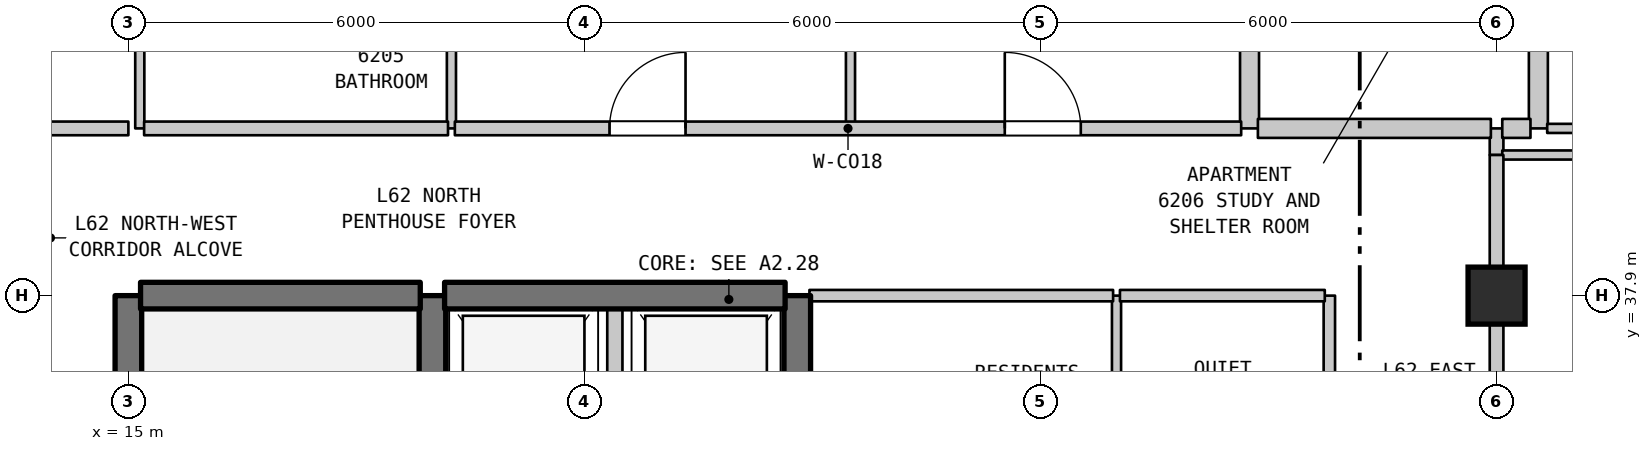
"""IFC4 building model, lengths in metres.
Left out: names, types, materials, properties, quantities, classifications, styles, units other than length and angle.
Written with IfcOpenShell. Run it as: python <this file> out.ifc"""

import sys

from ifc_helpers import new_model, si_unit, direction, frame, frame_2d, origin, origin_2d, place, context, subcontext, project, spatial, rectangle, extrude, element, fill, save


model = new_model("IFC4")
c1 = context("Model", 3, precision=1e-05, world=origin(), true_north=direction((0.0, 1.0)))
c2 = subcontext(c1, "Body", "Model", "MODEL_VIEW")
j1 = project(units=[si_unit("LENGTHUNIT", "METRE"), si_unit("PLANEANGLEUNIT", "RADIAN")], contexts=[c1])
p1 = place(None, origin())
s1 = spatial("IfcSite", under=j1, at=p1, CompositionType="ELEMENT")
p2 = place(p1, origin())
s2 = spatial("IfcBuilding", under=s1, at=p2, CompositionType="ELEMENT")
p3 = place(p2, frame((0.0, 0.0, 251.0)))
s3 = spatial("IfcBuildingStorey", under=s2, at=p3, CompositionType="ELEMENT", Elevation=251.0)
p4 = place(p3, frame((33.0, 37.9, 0.0), z_axis=(0.0, 0.0, 1.0), x_axis=(1.0, 0.0, 0.0)))
e1 = element("IfcColumn", 1, at=p4, inside=s3, PredefinedType="COLUMN", context=c2, shape_type="SweptSolid", body=[
    extrude(rectangle(XDim=0.75, YDim=0.75, at=origin_2d()), origin(), (0.0, 0.0, 1.0), 3.7),
])
p5 = place(p3, frame((15.0, 31.1, 0.0), z_axis=(0.0, 0.0, 1.0), x_axis=(0.0, 1.0, 0.0)))
e2 = element("IfcWall", 2, at=p5, inside=s3, PredefinedType="SHEAR", context=c2, shape_type="SweptSolid", body=[
    extrude(rectangle(XDim=6.8, YDim=0.35, at=frame_2d((3.4, 0.0))), origin(), (0.0, 0.0, 1.0), 3.39),
])
p6 = place(p3, frame((15.15, 40.1, 0.0), z_axis=(0.0, 0.0, 1.0), x_axis=(0.0, 1.0, 0.0)))
e3 = element("IfcWall", 3, at=p6, inside=s3, PredefinedType="PARTITIONING", context=c2, shape_type="SweptSolid", body=[
    extrude(rectangle(XDim=2.3, YDim=0.12, at=frame_2d((1.15, 0.0))), origin(), (0.0, 0.0, 1.0), 3.39),
])
p7 = place(p3, frame((19.0, 35.0, 0.0), z_axis=(0.0, 0.0, 1.0), x_axis=(0.0, 1.0, 0.0)))
e4 = element("IfcWall", 4, at=p7, inside=s3, PredefinedType="SHEAR", context=c2, shape_type="SweptSolid", body=[
    extrude(rectangle(XDim=2.9, YDim=0.35, at=frame_2d((1.45, 0.0))), origin(), (0.0, 0.0, 1.0), 3.39),
])
p8 = place(p3, frame((19.25, 40.1, 0.0), z_axis=(0.0, 0.0, 1.0), x_axis=(0.0, 1.0, 0.0)))
e5 = element("IfcWall", 5, at=p8, inside=s3, PredefinedType="PARTITIONING", context=c2, shape_type="SweptSolid", body=[
    extrude(rectangle(XDim=2.3, YDim=0.12, at=frame_2d((1.15, 0.0))), origin(), (0.0, 0.0, 1.0), 3.39),
])
p9 = place(p3, frame((21.4, 35.0, 0.0), z_axis=(0.0, 0.0, 1.0), x_axis=(0.0, 1.0, 0.0)))
e6 = element("IfcWall", 6, at=p9, inside=s3, PredefinedType="STANDARD", context=c2, shape_type="SweptSolid", body=[
    extrude(rectangle(XDim=2.9, YDim=0.2, at=frame_2d((1.45, 0.0))), origin(), (0.0, 0.0, 1.0), 3.39),
])
p10 = place(p3, frame((23.8, 35.0, 0.0), z_axis=(0.0, 0.0, 1.0), x_axis=(0.0, 1.0, 0.0)))
e7 = element("IfcWall", 7, at=p10, inside=s3, PredefinedType="SHEAR", context=c2, shape_type="SweptSolid", body=[
    extrude(rectangle(XDim=2.9, YDim=0.35, at=frame_2d((1.45, 0.0))), origin(), (0.0, 0.0, 1.0), 3.39),
])
p11 = place(p3, frame((24.5, 40.1, 0.0), z_axis=(0.0, 0.0, 1.0), x_axis=(0.0, 1.0, 0.0)))
e8 = element("IfcWall", 8, at=p11, inside=s3, PredefinedType="PARTITIONING", context=c2, shape_type="SweptSolid", body=[
    extrude(rectangle(XDim=2.05, YDim=0.12, at=frame_2d((1.025, 0.0))), origin(), (0.0, 0.0, 1.0), 3.39),
])
p12 = place(p3, frame((28.0, 35.0, 0.0), z_axis=(0.0, 0.0, 1.0), x_axis=(0.0, 1.0, 0.0)))
e9 = element("IfcWall", 9, at=p12, inside=s3, PredefinedType="PARTITIONING", context=c2, shape_type="SweptSolid", body=[
    extrude(rectangle(XDim=2.9, YDim=0.12, at=frame_2d((1.45, 0.0))), origin(), (0.0, 0.0, 1.0), 3.39),
])
p13 = place(p3, frame((29.75, 40.1, 0.0), z_axis=(0.0, 0.0, 1.0), x_axis=(0.0, 1.0, 0.0)))
e10 = element("IfcWall", 10, at=p13, inside=s3, PredefinedType="STANDARD", context=c2, shape_type="SweptSolid", body=[
    extrude(rectangle(XDim=2.3, YDim=0.25, at=frame_2d((1.15, 0.0))), origin(), (0.0, 0.0, 1.0), 3.39),
])
p14 = place(p3, frame((30.8, 35.0, 0.0), z_axis=(0.0, 0.0, 1.0), x_axis=(0.0, 1.0, 0.0)))
e11 = element("IfcWall", 11, at=p14, inside=s3, PredefinedType="STANDARD", context=c2, shape_type="SweptSolid", body=[
    extrude(rectangle(XDim=2.9, YDim=0.15, at=frame_2d((1.45, 0.0))), origin(), (0.0, 0.0, 1.0), 3.39),
])
p15 = place(p3, frame((33.0, 36.366, 0.0), z_axis=(0.0, 0.0, 1.0), x_axis=(0.0, 1.0, 0.0)))
e12 = element("IfcWall", 12, at=p15, inside=s3, PredefinedType="STANDARD", context=c2, shape_type="SweptSolid", body=[
    extrude(rectangle(XDim=1.534, YDim=0.18, at=frame_2d((0.767, 0.0))), origin(), (0.0, 0.0, 1.0), 2.89),
])
p16 = place(p3, frame((33.0, 39.75, 0.0), z_axis=(0.0, 0.0, 1.0), x_axis=(0.0, 1.0, 0.0)))
e13 = element("IfcWall", 13, at=p16, inside=s3, PredefinedType="STANDARD", context=c2, shape_type="SweptSolid", body=[
    extrude(rectangle(XDim=0.35, YDim=0.18, at=frame_2d((0.175, 0.0))), origin(), (0.0, 0.0, 1.0), 3.39),
])
p17 = place(p3, frame((33.55, 40.1, 0.0), z_axis=(0.0, 0.0, 1.0), x_axis=(0.0, 1.0, 0.0)))
e14 = element("IfcWall", 14, at=p17, inside=s3, PredefinedType="STANDARD", context=c2, shape_type="SweptSolid", body=[
    extrude(rectangle(XDim=2.3, YDim=0.25, at=frame_2d((1.15, 0.0))), origin(), (0.0, 0.0, 1.0), 3.39),
])
p18 = place(p3, frame((15.16, 37.9, 0.0), z_axis=(0.0, 0.0, 1.0), x_axis=(1.0, 0.0, 0.0)))
e15 = element("IfcWall", 15, at=p18, inside=s3, PredefinedType="SHEAR", context=c2, shape_type="SweptSolid", body=[
    extrude(rectangle(XDim=3.68, YDim=0.35, at=frame_2d((1.84, 0.0))), origin(), (0.0, 0.0, 1.0), 3.39),
])
p19 = place(p3, frame((19.16, 37.9, 0.0), z_axis=(0.0, 0.0, 1.0), x_axis=(1.0, 0.0, 0.0)))
e16 = element("IfcWall", 16, at=p19, inside=s3, PredefinedType="SHEAR", context=c2, shape_type="SweptSolid", body=[
    extrude(rectangle(XDim=4.48, YDim=0.35, at=frame_2d((2.24, 0.0))), origin(), (0.0, 0.0, 1.0), 3.39),
])
p20 = place(p3, frame((23.96, 37.9, 0.0), z_axis=(0.0, 0.0, 1.0), x_axis=(1.0, 0.0, 0.0)))
e17 = element("IfcWall", 17, at=p20, inside=s3, PredefinedType="STANDARD", context=c2, shape_type="SweptSolid", body=[
    extrude(rectangle(XDim=3.995, YDim=0.15, at=frame_2d((1.998, 0.0))), origin(), (0.0, 0.0, 1.0), 2.89),
])
p21 = place(p3, frame((28.045, 37.9, 0.0), z_axis=(0.0, 0.0, 1.0), x_axis=(1.0, 0.0, 0.0)))
e18 = element("IfcWall", 18, at=p21, inside=s3, PredefinedType="STANDARD", context=c2, shape_type="SweptSolid", body=[
    extrude(rectangle(XDim=2.695, YDim=0.15, at=frame_2d((1.348, 0.0))), origin(), (0.0, 0.0, 1.0), 2.89),
])
p22 = place(p3, frame((33.075, 39.75, 0.0), z_axis=(0.0, 0.0, 1.0), x_axis=(1.0, 0.0, 0.0)))
e19 = element("IfcWall", 19, at=p22, inside=s3, PredefinedType="PARTITIONING", context=c2, shape_type="SweptSolid", body=[
    extrude(rectangle(XDim=4.46, YDim=0.12, at=frame_2d((2.23, 0.0))), origin(), (0.0, 0.0, 1.0), 3.39),
])
p23 = place(p3, frame((12.975, 40.1, 0.0), z_axis=(0.0, 0.0, 1.0), x_axis=(1.0, 0.0, 0.0)))
e20 = element("IfcWall", 20, at=p23, inside=s3, PredefinedType="STANDARD", context=c2, shape_type="SweptSolid", body=[
    extrude(rectangle(XDim=2.025, YDim=0.18, at=frame_2d((1.012, 0.0))), origin(), (0.0, 0.0, 1.0), 3.39),
])
p24 = place(p3, frame((15.207, 40.1, 0.0), z_axis=(0.0, 0.0, 1.0), x_axis=(1.0, 0.0, 0.0)))
e21 = element("IfcWall", 21, at=p24, inside=s3, PredefinedType="STANDARD", context=c2, shape_type="SweptSolid", body=[
    extrude(rectangle(XDim=3.998, YDim=0.18, at=frame_2d((1.999, 0.0))), origin(), (0.0, 0.0, 1.0), 3.39),
])
p25 = place(p3, frame((19.295, 40.1, 0.0), z_axis=(0.0, 0.0, 1.0), x_axis=(1.0, 0.0, 0.0)))
e22 = element("IfcWall", 22, at=p25, inside=s3, PredefinedType="STANDARD", context=c2, shape_type="SweptSolid", body=[
    extrude(rectangle(XDim=10.345, YDim=0.18, at=frame_2d((5.172, 0.0))), origin(), (0.0, 0.0, 1.0), 3.39),
])
p26 = place(p25, frame((2.035, 0.0, 0.0)))
e23 = element("IfcOpeningElement", 23, at=p26, cuts=e22, PredefinedType="OPENING", context=c2, shape_type="SweptSolid", body=[
    extrude(rectangle(XDim=1.0, YDim=2.15, at=frame_2d((0.5, 1.075))), frame((0.0, 0.1, 0.0), z_axis=(0.0, -1.0, 0.0), x_axis=(1.0, 0.0, 0.0)), (0.0, 0.0, 1.0), 0.2),
])
p27 = place(p25, frame((7.235, 0.0, 0.0)))
e24 = element("IfcOpeningElement", 24, at=p27, cuts=e22, PredefinedType="OPENING", context=c2, shape_type="SweptSolid", body=[
    extrude(rectangle(XDim=1.0, YDim=2.15, at=frame_2d((0.5, 1.075))), frame((0.0, 0.1, 0.0), z_axis=(0.0, -1.0, 0.0), x_axis=(1.0, 0.0, 0.0)), (0.0, 0.0, 1.0), 0.2),
])
p28 = place(p3, frame((29.86, 40.1, 0.0), z_axis=(0.0, 0.0, 1.0), x_axis=(1.0, 0.0, 0.0)))
e25 = element("IfcWall", 25, at=p28, inside=s3, PredefinedType="STANDARD", context=c2, shape_type="SweptSolid", body=[
    extrude(rectangle(XDim=3.065, YDim=0.25, at=frame_2d((1.532, 0.0))), origin(), (0.0, 0.0, 1.0), 3.39),
])
p29 = place(p3, frame((33.075, 40.1, 0.0), z_axis=(0.0, 0.0, 1.0), x_axis=(1.0, 0.0, 0.0)))
e26 = element("IfcWall", 26, at=p29, inside=s3, PredefinedType="STANDARD", context=c2, shape_type="SweptSolid", body=[
    extrude(rectangle(XDim=0.371, YDim=0.25, at=frame_2d((0.186, 0.0))), origin(), (0.0, 0.0, 1.0), 3.39),
])
p30 = place(p3, frame((33.666, 40.1, 0.0), z_axis=(0.0, 0.0, 1.0), x_axis=(1.0, 0.0, 0.0)))
e27 = element("IfcWall", 27, at=p30, inside=s3, PredefinedType="PARTITIONING", context=c2, shape_type="SweptSolid", body=[
    extrude(rectangle(XDim=2.925, YDim=0.12, at=frame_2d((1.462, 0.0))), origin(), (0.0, 0.0, 1.0), 3.39),
])
p31 = place(p3, frame((33.0, 37.9, 0.0), z_axis=(0.0, 0.0, 1.0), x_axis=(0.0, 1.0, 0.0)))
e28 = element("IfcWall", 28, at=p31, inside=s3, PredefinedType="STANDARD", context=c2, shape_type="SweptSolid", body=[
    extrude(rectangle(XDim=1.85, YDim=0.18, at=frame_2d((0.925, 0.0))), origin(), (0.0, 0.0, 1.0), 2.79),
])
p32 = place(p26, origin())
e29 = element("IfcDoor", 29, at=p32, inside=s3, OperationType="SINGLE_SWING_RIGHT", PredefinedType="DOOR", context=c2, shape_type="SweptSolid", body=[
    extrude(rectangle(XDim=1.0, YDim=2.15, at=frame_2d((0.5, 1.075))), frame((0.0, 0.025, 0.0), z_axis=(0.0, -1.0, 0.0), x_axis=(1.0, 0.0, 0.0)), (0.0, 0.0, 1.0), 0.05),
])
fill(e23, e29)
p33 = place(p27, origin())
e30 = element("IfcDoor", 30, at=p33, inside=s3, OperationType="SINGLE_SWING_LEFT", PredefinedType="DOOR", context=c2, shape_type="SweptSolid", body=[
    extrude(rectangle(XDim=1.0, YDim=2.15, at=frame_2d((0.5, 1.075))), frame((0.0, 0.025, 0.0), z_axis=(0.0, -1.0, 0.0), x_axis=(1.0, 0.0, 0.0)), (0.0, 0.0, 1.0), 0.05),
])
fill(e24, e30)
save(model, sys.argv[1])
